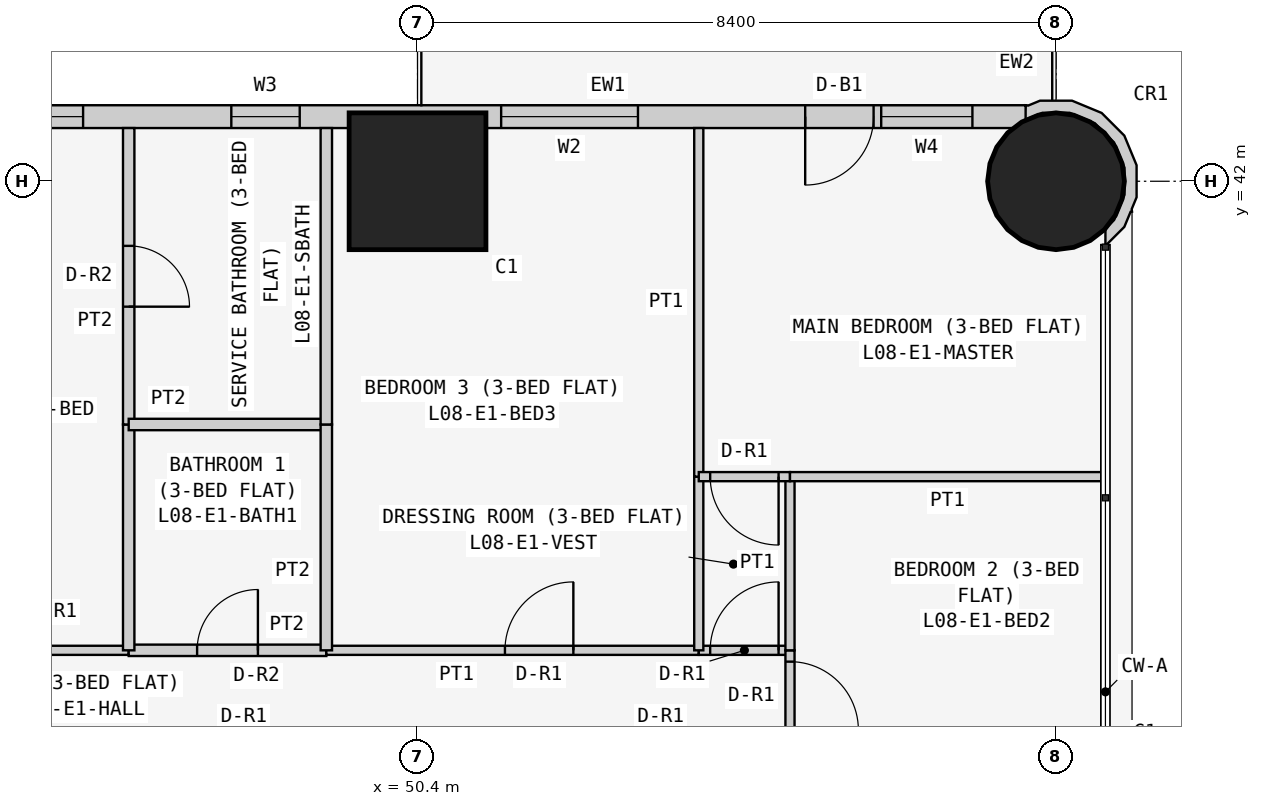
"""IFC4 building model, lengths in metres.
Left out: names, types, materials, properties, quantities, classifications, styles, units other than length and angle.
Written with IfcOpenShell. Run it as: python <this file> out.ifc"""

import sys

from ifc_helpers import new_model, si_unit, direction, frame, frame_2d, origin, origin_2d, place, context, subcontext, project, spatial, polyline, rectangle, circle, outline, extrude, element, fill, save


model = new_model("IFC4")
c1 = context("Model", 3, precision=1e-05, world=origin(), true_north=direction((0.0, 1.0)))
c2 = subcontext(c1, "Body", "Model", "MODEL_VIEW")
j1 = project(units=[si_unit("LENGTHUNIT", "METRE"), si_unit("PLANEANGLEUNIT", "RADIAN")], contexts=[c1])
p1 = place(None, origin())
s1 = spatial("IfcSite", under=j1, at=p1, CompositionType="ELEMENT")
p2 = place(p1, origin())
s2 = spatial("IfcBuilding", under=s1, at=p2, CompositionType="ELEMENT")
p3 = place(p2, frame((0.0, 0.0, 38.1)))
s3 = spatial("IfcBuildingStorey", under=s2, at=p3, CompositionType="ELEMENT", Elevation=38.1)
p4 = place(p3, frame((50.4, 42.0, 0.0), z_axis=(0.0, 0.0, 1.0), x_axis=(1.0, 0.0, 0.0)))
e1 = element("IfcColumn", 1, at=p4, inside=s3, PredefinedType="COLUMN", context=c2, shape_type="SweptSolid", body=[
    extrude(rectangle(XDim=1.8, YDim=1.8, at=origin_2d()), origin(), (0.0, 0.0, 1.0), 3.6),
])
p5 = place(p3, frame((58.8, 42.0, 0.0), z_axis=(0.0, 0.0, 1.0), x_axis=(1.0, 0.0, 0.0)))
e2 = element("IfcColumn", 2, at=p5, inside=s3, PredefinedType="COLUMN", context=c2, shape_type="SweptSolid", body=[
    extrude(circle(Radius=0.9, at=origin_2d()), origin(), (0.0, 0.0, 1.0), 3.6),
])
p6 = place(p3, frame((58.4, 42.85, 0.0), z_axis=(0.0, 0.0, 1.0), x_axis=(-1.0, 0.0, 0.0)))
e3 = element("IfcWall", 3, at=p6, inside=s3, PredefinedType="SOLIDWALL", context=c2, shape_type="SweptSolid", body=[
    extrude(rectangle(XDim=15.7, YDim=0.3, at=frame_2d((7.85, 0.0))), origin(), (0.0, 0.0, 1.0), 3.45),
])
p7 = place(p6, frame((12.4, 0.0, 0.9)))
e4 = element("IfcOpeningElement", 4, at=p7, cuts=e3, PredefinedType="OPENING", context=c2, shape_type="SweptSolid", body=[
    extrude(rectangle(XDim=1.8, YDim=1.5, at=frame_2d((0.9, 0.75))), frame((0.0, 0.16, 0.0), z_axis=(0.0, -1.0, 0.0), x_axis=(1.0, 0.0, 0.0)), (0.0, 0.0, 1.0), 0.32),
])
p8 = place(p6, frame((9.55, 0.0, 1.5)))
e5 = element("IfcOpeningElement", 5, at=p8, cuts=e3, PredefinedType="OPENING", context=c2, shape_type="SweptSolid", body=[
    extrude(rectangle(XDim=0.9, YDim=0.7, at=frame_2d((0.45, 0.35))), frame((0.0, 0.16, 0.0), z_axis=(0.0, -1.0, 0.0), x_axis=(1.0, 0.0, 0.0)), (0.0, 0.0, 1.0), 0.32),
])
p9 = place(p6, frame((5.1, 0.0, 0.9)))
e6 = element("IfcOpeningElement", 6, at=p9, cuts=e3, PredefinedType="OPENING", context=c2, shape_type="SweptSolid", body=[
    extrude(rectangle(XDim=1.8, YDim=1.5, at=frame_2d((0.9, 0.75))), frame((0.0, 0.16, 0.0), z_axis=(0.0, -1.0, 0.0), x_axis=(1.0, 0.0, 0.0)), (0.0, 0.0, 1.0), 0.32),
])
p10 = place(p6, frame((2.0, 0.0, 0.0)))
e7 = element("IfcOpeningElement", 7, at=p10, cuts=e3, PredefinedType="OPENING", context=c2, shape_type="SweptSolid", body=[
    extrude(rectangle(XDim=0.9, YDim=2.4, at=frame_2d((0.45, 1.2))), frame((0.0, 0.16, 0.0), z_axis=(0.0, -1.0, 0.0), x_axis=(1.0, 0.0, 0.0)), (0.0, 0.0, 1.0), 0.32),
])
p11 = place(p6, frame((0.7, 0.0, 0.9)))
e8 = element("IfcOpeningElement", 8, at=p11, cuts=e3, PredefinedType="OPENING", context=c2, shape_type="SweptSolid", body=[
    extrude(rectangle(XDim=1.2, YDim=1.5, at=frame_2d((0.6, 0.75))), frame((0.0, 0.16, 0.0), z_axis=(0.0, -1.0, 0.0), x_axis=(1.0, 0.0, 0.0)), (0.0, 0.0, 1.0), 0.32),
])
p12 = place(p3, frame((59.411, 41.233, 0.0), z_axis=(0.0, 0.0, 1.0), x_axis=(0.926129809145, 0.377204953059, 0.0)))
e9 = element("IfcWall", 9, at=p12, inside=s3, PredefinedType="SOLIDWALL", context=c2, shape_type="SweptSolid", body=[
    extrude(outline(polyline([(0.626, 0.345), (0.785, 0.736), (0.782, 1.157), (0.619, 1.546), (0.319, 1.843), (-0.072, 2.002), (-0.24, 2.001), (-0.27, 2.017), (-0.37, 1.841), (-0.102, 1.842), (0.23, 1.707), (0.485, 1.455), (0.624, 1.125), (0.626, 0.766), (0.491, 0.434), (0.238, 0.179), (0.09, 0.117), (0.011, -0.078), (0.024, -0.083), (0.329, 0.045), (0.48, 0.198), (0.499, 0.193), (0.508, 0.225), (0.626, 0.345)])), origin(), (0.0, 0.0, 1.0), 3.45),
])
p13 = place(p3, frame((46.6, 35.829, 0.0), z_axis=(0.0, 0.0, 1.0), x_axis=(-1.0, 0.0, 0.0)))
e10 = element("IfcWall", 10, at=p13, inside=s3, PredefinedType="PARTITIONING", context=c2, shape_type="SweptSolid", body=[
    extrude(rectangle(XDim=3.575, YDim=0.12, at=frame_2d((1.788, 0.0))), origin(), (0.0, 0.0, 1.0), 3.45),
])
p14 = place(p13, frame((1.35, 0.0, 0.0)))
e11 = element("IfcOpeningElement", 11, at=p14, cuts=e10, PredefinedType="OPENING", context=c2, shape_type="SweptSolid", body=[
    extrude(rectangle(XDim=0.9, YDim=2.1, at=frame_2d((0.45, 1.05))), frame((0.0, 0.07, 0.0), z_axis=(0.0, -1.0, 0.0), x_axis=(1.0, 0.0, 0.0)), (0.0, 0.0, 1.0), 0.14),
])
p15 = place(p3, frame((49.2, 35.829, 0.0), z_axis=(0.0, 0.0, 1.0), x_axis=(-1.0, 0.0, 0.0)))
e12 = element("IfcWall", 12, at=p15, inside=s3, PredefinedType="PARTITIONING", context=c2, shape_type="SweptSolid", body=[
    extrude(rectangle(XDim=2.6, YDim=0.15, at=frame_2d((1.3, 0.0))), origin(), (0.0, 0.0, 1.0), 3.45),
])
p16 = place(p15, frame((0.9, 0.0, 0.0)))
e13 = element("IfcOpeningElement", 13, at=p16, cuts=e12, PredefinedType="OPENING", context=c2, shape_type="SweptSolid", body=[
    extrude(rectangle(XDim=0.8, YDim=2.1, at=frame_2d((0.4, 1.05))), frame((0.0, 0.085, 0.0), z_axis=(0.0, -1.0, 0.0), x_axis=(1.0, 0.0, 0.0)), (0.0, 0.0, 1.0), 0.17),
])
p17 = place(p3, frame((54.1, 35.829, 0.0), z_axis=(0.0, 0.0, 1.0), x_axis=(-1.0, 0.0, 0.0)))
e14 = element("IfcWall", 14, at=p17, inside=s3, PredefinedType="PARTITIONING", context=c2, shape_type="SweptSolid", body=[
    extrude(rectangle(XDim=4.9, YDim=0.12, at=frame_2d((2.45, 0.0))), origin(), (0.0, 0.0, 1.0), 3.45),
])
p18 = place(p17, frame((1.65, 0.0, 0.0)))
e15 = element("IfcOpeningElement", 15, at=p18, cuts=e14, PredefinedType="OPENING", context=c2, shape_type="SweptSolid", body=[
    extrude(rectangle(XDim=0.9, YDim=2.1, at=frame_2d((0.45, 1.05))), frame((0.0, 0.07, 0.0), z_axis=(0.0, -1.0, 0.0), x_axis=(1.0, 0.0, 0.0)), (0.0, 0.0, 1.0), 0.14),
])
p19 = place(p3, frame((55.3, 35.829, 0.0), z_axis=(0.0, 0.0, 1.0), x_axis=(-1.0, 0.0, 0.0)))
e16 = element("IfcWall", 16, at=p19, inside=s3, PredefinedType="PARTITIONING", context=c2, shape_type="SweptSolid", body=[
    extrude(rectangle(XDim=1.2, YDim=0.12, at=frame_2d((0.6, 0.0))), origin(), (0.0, 0.0, 1.0), 3.45),
])
p20 = place(p19, frame((0.15, 0.0, 0.0)))
e17 = element("IfcOpeningElement", 17, at=p20, cuts=e16, PredefinedType="OPENING", context=c2, shape_type="SweptSolid", body=[
    extrude(rectangle(XDim=0.9, YDim=2.1, at=frame_2d((0.45, 1.05))), frame((0.0, 0.07, 0.0), z_axis=(0.0, -1.0, 0.0), x_axis=(1.0, 0.0, 0.0)), (0.0, 0.0, 1.0), 0.14),
])
p21 = place(p3, frame((55.3, 34.629, 0.0), z_axis=(0.0, 0.0, 1.0), x_axis=(0.0, 1.0, 0.0)))
e18 = element("IfcWall", 18, at=p21, inside=s3, PredefinedType="PARTITIONING", context=c2, shape_type="SweptSolid", body=[
    extrude(rectangle(XDim=1.2, YDim=0.12, at=frame_2d((0.6, 0.0))), origin(), (0.0, 0.0, 1.0), 3.45),
])
p22 = place(p21, frame((0.151, 0.0, 0.0)))
e19 = element("IfcOpeningElement", 19, at=p22, cuts=e18, PredefinedType="OPENING", context=c2, shape_type="SweptSolid", body=[
    extrude(rectangle(XDim=0.9, YDim=2.1, at=frame_2d((0.45, 1.05))), frame((0.0, 0.07, 0.0), z_axis=(0.0, -1.0, 0.0), x_axis=(1.0, 0.0, 0.0)), (0.0, 0.0, 1.0), 0.14),
])
p23 = place(p3, frame((46.6, 35.829, 0.0), z_axis=(0.0, 0.0, 1.0), x_axis=(0.0, 1.0, 0.0)))
e20 = element("IfcWall", 20, at=p23, inside=s3, PredefinedType="PARTITIONING", context=c2, shape_type="SweptSolid", body=[
    extrude(rectangle(XDim=2.971, YDim=0.15, at=frame_2d((1.485, 0.0))), origin(), (0.0, 0.0, 1.0), 3.45),
])
p24 = place(p3, frame((46.6, 38.8, 0.0), z_axis=(0.0, 0.0, 1.0), x_axis=(0.0, 1.0, 0.0)))
e21 = element("IfcWall", 21, at=p24, inside=s3, PredefinedType="PARTITIONING", context=c2, shape_type="SweptSolid", body=[
    extrude(rectangle(XDim=3.9, YDim=0.15, at=frame_2d((1.95, 0.0))), origin(), (0.0, 0.0, 1.0), 3.45),
])
p25 = place(p24, frame((1.55, 0.0, 0.0)))
e22 = element("IfcOpeningElement", 22, at=p25, cuts=e21, PredefinedType="OPENING", context=c2, shape_type="SweptSolid", body=[
    extrude(rectangle(XDim=0.8, YDim=2.1, at=frame_2d((0.4, 1.05))), frame((0.0, 0.085, 0.0), z_axis=(0.0, -1.0, 0.0), x_axis=(1.0, 0.0, 0.0)), (0.0, 0.0, 1.0), 0.17),
])
p26 = place(p3, frame((49.2, 38.8, 0.0), z_axis=(0.0, 0.0, 1.0), x_axis=(-1.0, 0.0, 0.0)))
e23 = element("IfcWall", 23, at=p26, inside=s3, PredefinedType="PARTITIONING", context=c2, shape_type="SweptSolid", body=[
    extrude(rectangle(XDim=2.6, YDim=0.15, at=frame_2d((1.3, 0.0))), origin(), (0.0, 0.0, 1.0), 3.45),
])
p27 = place(p3, frame((49.2, 35.829, 0.0), z_axis=(0.0, 0.0, 1.0), x_axis=(0.0, 1.0, 0.0)))
e24 = element("IfcWall", 24, at=p27, inside=s3, PredefinedType="PARTITIONING", context=c2, shape_type="SweptSolid", body=[
    extrude(rectangle(XDim=2.971, YDim=0.15, at=frame_2d((1.485, 0.0))), origin(), (0.0, 0.0, 1.0), 3.45),
])
p28 = place(p3, frame((49.2, 38.8, 0.0), z_axis=(0.0, 0.0, 1.0), x_axis=(0.0, 1.0, 0.0)))
e25 = element("IfcWall", 25, at=p28, inside=s3, PredefinedType="PARTITIONING", context=c2, shape_type="SweptSolid", body=[
    extrude(rectangle(XDim=3.9, YDim=0.15, at=frame_2d((1.95, 0.0))), origin(), (0.0, 0.0, 1.0), 3.45),
])
p29 = place(p3, frame((54.1, 35.829, 0.0), z_axis=(0.0, 0.0, 1.0), x_axis=(0.0, 1.0, 0.0)))
e26 = element("IfcWall", 26, at=p29, inside=s3, PredefinedType="PARTITIONING", context=c2, shape_type="SweptSolid", body=[
    extrude(rectangle(XDim=2.285, YDim=0.12, at=frame_2d((1.143, 0.0))), origin(), (0.0, 0.0, 1.0), 3.45),
])
p30 = place(p3, frame((54.1, 38.114, 0.0), z_axis=(0.0, 0.0, 1.0), x_axis=(0.0, 1.0, 0.0)))
e27 = element("IfcWall", 27, at=p30, inside=s3, PredefinedType="PARTITIONING", context=c2, shape_type="SweptSolid", body=[
    extrude(rectangle(XDim=4.586, YDim=0.12, at=frame_2d((2.293, 0.0))), origin(), (0.0, 0.0, 1.0), 3.45),
])
p31 = place(p3, frame((55.3, 35.829, 0.0), z_axis=(0.0, 0.0, 1.0), x_axis=(0.0, 1.0, 0.0)))
e28 = element("IfcWall", 28, at=p31, inside=s3, PredefinedType="PARTITIONING", context=c2, shape_type="SweptSolid", body=[
    extrude(rectangle(XDim=2.285, YDim=0.12, at=frame_2d((1.143, 0.0))), origin(), (0.0, 0.0, 1.0), 3.45),
])
p32 = place(p3, frame((55.3, 38.114, 0.0), z_axis=(0.0, 0.0, 1.0), x_axis=(-1.0, 0.0, 0.0)))
e29 = element("IfcWall", 29, at=p32, inside=s3, PredefinedType="PARTITIONING", context=c2, shape_type="SweptSolid", body=[
    extrude(rectangle(XDim=1.2, YDim=0.12, at=frame_2d((0.6, 0.0))), origin(), (0.0, 0.0, 1.0), 3.45),
])
p33 = place(p32, frame((0.15, 0.0, 0.0)))
e30 = element("IfcOpeningElement", 30, at=p33, cuts=e29, PredefinedType="OPENING", context=c2, shape_type="SweptSolid", body=[
    extrude(rectangle(XDim=0.9, YDim=2.1, at=frame_2d((0.45, 1.05))), frame((0.0, 0.07, 0.0), z_axis=(0.0, -1.0, 0.0), x_axis=(1.0, 0.0, 0.0)), (0.0, 0.0, 1.0), 0.14),
])
p34 = place(p3, frame((59.45, 38.114, 0.0), z_axis=(0.0, 0.0, 1.0), x_axis=(-1.0, 0.0, 0.0)))
e31 = element("IfcWall", 31, at=p34, inside=s3, PredefinedType="PARTITIONING", context=c2, shape_type="SweptSolid", body=[
    extrude(rectangle(XDim=4.15, YDim=0.12, at=frame_2d((2.075, 0.0))), origin(), (0.0, 0.0, 1.0), 3.45),
])
p35 = place(p7, origin())
e32 = element("IfcWindow", 32, at=p35, inside=s3, PartitioningType="SINGLE_PANEL", PredefinedType="WINDOW", context=c2, shape_type="SweptSolid", body=[
    extrude(rectangle(XDim=1.8, YDim=1.5, at=frame_2d((0.9, 0.75))), frame((0.0, 0.03, 0.0), z_axis=(0.0, -1.0, 0.0), x_axis=(1.0, 0.0, 0.0)), (0.0, 0.0, 1.0), 0.06),
])
fill(e4, e32)
p36 = place(p8, origin())
e33 = element("IfcWindow", 33, at=p36, inside=s3, PartitioningType="SINGLE_PANEL", PredefinedType="WINDOW", context=c2, shape_type="SweptSolid", body=[
    extrude(rectangle(XDim=0.9, YDim=0.7, at=frame_2d((0.45, 0.35))), frame((0.0, 0.03, 0.0), z_axis=(0.0, -1.0, 0.0), x_axis=(1.0, 0.0, 0.0)), (0.0, 0.0, 1.0), 0.06),
])
fill(e5, e33)
p37 = place(p9, origin())
e34 = element("IfcWindow", 34, at=p37, inside=s3, PartitioningType="SINGLE_PANEL", PredefinedType="WINDOW", context=c2, shape_type="SweptSolid", body=[
    extrude(rectangle(XDim=1.8, YDim=1.5, at=frame_2d((0.9, 0.75))), frame((0.0, 0.03, 0.0), z_axis=(0.0, -1.0, 0.0), x_axis=(1.0, 0.0, 0.0)), (0.0, 0.0, 1.0), 0.06),
])
fill(e6, e34)
p38 = place(p10, origin())
e35 = element("IfcDoor", 35, at=p38, inside=s3, OperationType="SINGLE_SWING_RIGHT", PredefinedType="DOOR", context=c2, shape_type="SweptSolid", body=[
    extrude(rectangle(XDim=0.9, YDim=2.4, at=frame_2d((0.45, 1.2))), frame((0.0, 0.025, 0.0), z_axis=(0.0, -1.0, 0.0), x_axis=(1.0, 0.0, 0.0)), (0.0, 0.0, 1.0), 0.05),
])
fill(e7, e35)
p39 = place(p11, origin())
e36 = element("IfcWindow", 36, at=p39, inside=s3, PartitioningType="SINGLE_PANEL", PredefinedType="WINDOW", context=c2, shape_type="SweptSolid", body=[
    extrude(rectangle(XDim=1.2, YDim=1.5, at=frame_2d((0.6, 0.75))), frame((0.0, 0.03, 0.0), z_axis=(0.0, -1.0, 0.0), x_axis=(1.0, 0.0, 0.0)), (0.0, 0.0, 1.0), 0.06),
])
fill(e8, e36)
p40 = place(p25, frame((0.8, 0.0, 0.0), z_axis=(0.0, 0.0, 1.0), x_axis=(-1.0, 0.0, 0.0)))
e37 = element("IfcDoor", 37, at=p40, inside=s3, OperationType="SINGLE_SWING_RIGHT", PredefinedType="DOOR", context=c2, shape_type="SweptSolid", body=[
    extrude(rectangle(XDim=0.8, YDim=2.1, at=frame_2d((0.4, 1.05))), frame((0.0, 0.025, 0.0), z_axis=(0.0, -1.0, 0.0), x_axis=(1.0, 0.0, 0.0)), (0.0, 0.0, 1.0), 0.05),
])
fill(e22, e37)
p41 = place(p16, frame((0.8, 0.0, 0.0), z_axis=(0.0, 0.0, 1.0), x_axis=(-1.0, 0.0, 0.0)))
e38 = element("IfcDoor", 38, at=p41, inside=s3, OperationType="SINGLE_SWING_RIGHT", PredefinedType="DOOR", context=c2, shape_type="SweptSolid", body=[
    extrude(rectangle(XDim=0.8, YDim=2.1, at=frame_2d((0.4, 1.05))), frame((0.0, 0.025, 0.0), z_axis=(0.0, -1.0, 0.0), x_axis=(1.0, 0.0, 0.0)), (0.0, 0.0, 1.0), 0.05),
])
fill(e13, e38)
p42 = place(p18, frame((0.9, 0.0, 0.0), z_axis=(0.0, 0.0, 1.0), x_axis=(-1.0, 0.0, 0.0)))
e39 = element("IfcDoor", 39, at=p42, inside=s3, OperationType="SINGLE_SWING_RIGHT", PredefinedType="DOOR", context=c2, shape_type="SweptSolid", body=[
    extrude(rectangle(XDim=0.9, YDim=2.1, at=frame_2d((0.45, 1.05))), frame((0.0, 0.025, 0.0), z_axis=(0.0, -1.0, 0.0), x_axis=(1.0, 0.0, 0.0)), (0.0, 0.0, 1.0), 0.05),
])
fill(e15, e39)
p43 = place(p20, frame((0.9, 0.0, 0.0), z_axis=(0.0, 0.0, 1.0), x_axis=(-1.0, 0.0, 0.0)))
e40 = element("IfcDoor", 40, at=p43, inside=s3, OperationType="SINGLE_SWING_RIGHT", PredefinedType="DOOR", context=c2, shape_type="SweptSolid", body=[
    extrude(rectangle(XDim=0.9, YDim=2.1, at=frame_2d((0.45, 1.05))), frame((0.0, 0.025, 0.0), z_axis=(0.0, -1.0, 0.0), x_axis=(1.0, 0.0, 0.0)), (0.0, 0.0, 1.0), 0.05),
])
fill(e17, e40)
p44 = place(p33, origin())
e41 = element("IfcDoor", 41, at=p44, inside=s3, OperationType="SINGLE_SWING_LEFT", PredefinedType="DOOR", context=c2, shape_type="SweptSolid", body=[
    extrude(rectangle(XDim=0.9, YDim=2.1, at=frame_2d((0.45, 1.05))), frame((0.0, 0.025, 0.0), z_axis=(0.0, -1.0, 0.0), x_axis=(1.0, 0.0, 0.0)), (0.0, 0.0, 1.0), 0.05),
])
fill(e30, e41)
p45 = place(p22, frame((0.9, 0.0, 0.0), z_axis=(0.0, 0.0, 1.0), x_axis=(-1.0, 0.0, 0.0)))
e42 = element("IfcDoor", 42, at=p45, inside=s3, OperationType="SINGLE_SWING_RIGHT", PredefinedType="DOOR", context=c2, shape_type="SweptSolid", body=[
    extrude(rectangle(XDim=0.9, YDim=2.1, at=frame_2d((0.45, 1.05))), frame((0.0, 0.025, 0.0), z_axis=(0.0, -1.0, 0.0), x_axis=(1.0, 0.0, 0.0)), (0.0, 0.0, 1.0), 0.05),
])
fill(e19, e42)
save(model, sys.argv[1])
